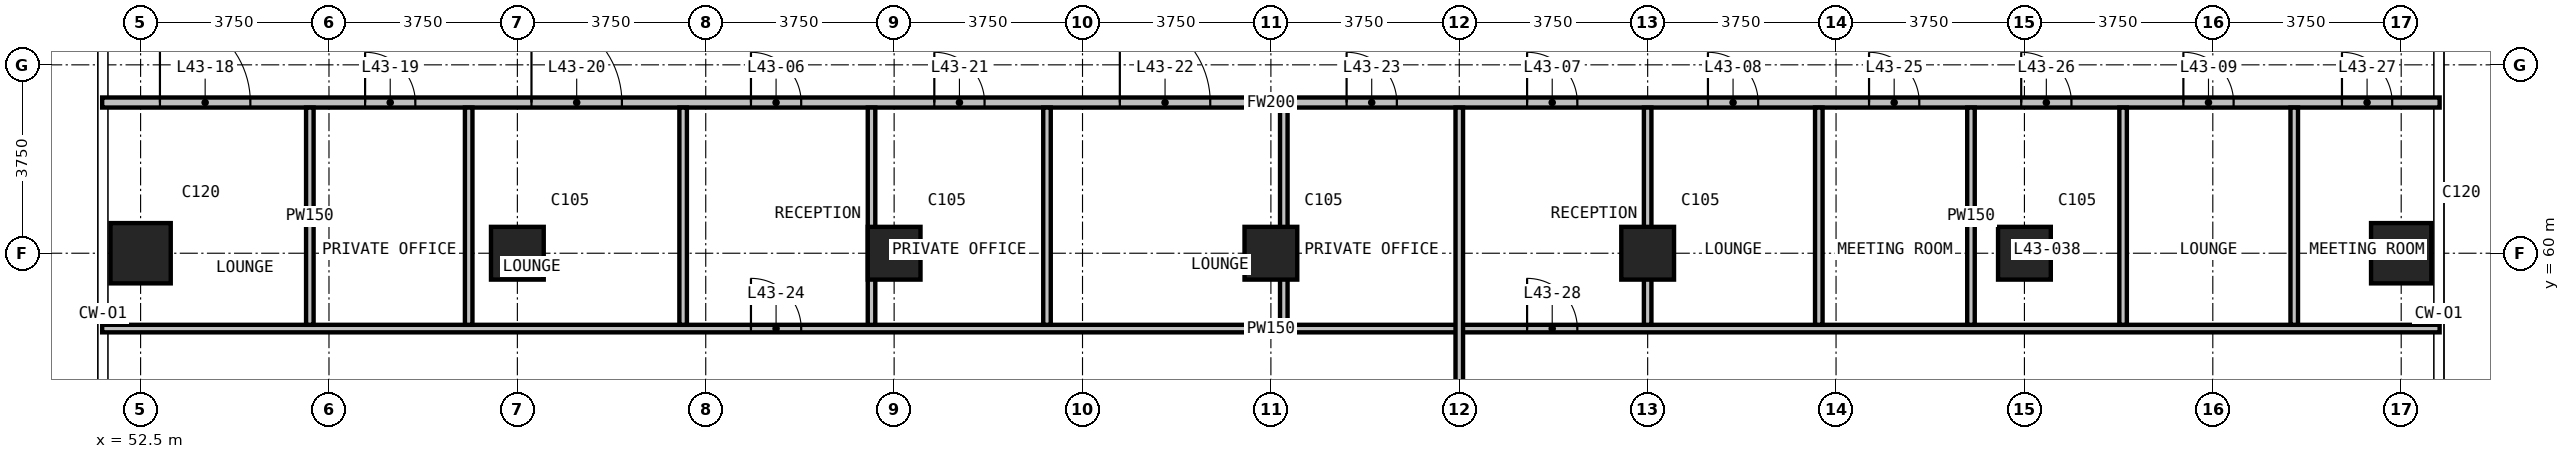
"""IFC4 building model, lengths in metres.
Left out: names, types, materials, properties, quantities, classifications, styles, units other than length and angle.
Written with IfcOpenShell. Run it as: python <this file> out.ifc"""

import sys

from ifc_helpers import new_model, si_unit, direction, frame, frame_2d, origin, origin_2d, place, context, subcontext, project, spatial, rectangle, extrude, element, fill, save


model = new_model("IFC4")
c1 = context("Model", 3, precision=1e-05, world=origin(), true_north=direction((0.0, 1.0)))
c2 = subcontext(c1, "Body", "Model", "MODEL_VIEW")
j1 = project(units=[si_unit("LENGTHUNIT", "METRE"), si_unit("PLANEANGLEUNIT", "RADIAN")], contexts=[c1])
p1 = place(None, origin())
s1 = spatial("IfcSite", under=j1, at=p1, CompositionType="ELEMENT")
p2 = place(p1, origin())
s2 = spatial("IfcBuilding", under=s1, at=p2, CompositionType="ELEMENT")
p3 = place(p2, frame((0.0, 0.0, 169.3)))
s3 = spatial("IfcBuildingStorey", under=s2, at=p3, CompositionType="ELEMENT", Elevation=169.3)
p4 = place(p3, frame((52.5, 60.0, 0.0), z_axis=(0.0, 0.0, 1.0), x_axis=(1.0, 0.0, 0.0)))
e1 = element("IfcColumn", 1, at=p4, inside=s3, PredefinedType="COLUMN", context=c2, shape_type="SweptSolid", body=[
    extrude(rectangle(XDim=1.2, YDim=1.2, at=origin_2d()), origin(), (0.0, 0.0, 1.0), 3.6),
])
for number, where, z_axis, x_axis in (
    (2, (60.0, 60.0, 0.0), (0.0, 0.0, 1.0), (1.0, 0.0, 0.0)),
    (3, (67.5, 60.0, 0.0), (0.0, 0.0, 1.0), (1.0, 0.0, 0.0)),
    (4, (75.0, 60.0, 0.0), (0.0, 0.0, 1.0), (1.0, 0.0, 0.0)),
    (5, (82.5, 60.0, 0.0), (0.0, 0.0, 1.0), (1.0, 0.0, 0.0)),
    (6, (90.0, 60.0, 0.0), (0.0, 0.0, 1.0), (1.0, 0.0, 0.0)),
):
    element("IfcColumn", number, at=place(p3, frame(where, z_axis=z_axis, x_axis=x_axis)), inside=s3, PredefinedType="COLUMN", context=c2, shape_type="SweptSolid", body=[
        extrude(rectangle(XDim=1.05, YDim=1.05, at=origin_2d()), origin(), (0.0, 0.0, 1.0), 3.6),
    ])
p5 = place(p3, frame((97.5, 60.0, 0.0), z_axis=(0.0, 0.0, 1.0), x_axis=(1.0, 0.0, 0.0)))
e7 = element("IfcColumn", 7, at=p5, inside=s3, PredefinedType="COLUMN", context=c2, shape_type="SweptSolid", body=[
    extrude(rectangle(XDim=1.2, YDim=1.2, at=origin_2d()), origin(), (0.0, 0.0, 1.0), 3.6),
])
p6 = place(p3, frame((51.735, 63.0, 0.0), z_axis=(0.0, 0.0, 1.0), x_axis=(1.0, 0.0, 0.0)))
e8 = element("IfcWall", 8, at=p6, inside=s3, PredefinedType="PARTITIONING", context=c2, shape_type="SweptSolid", body=[
    extrude(rectangle(XDim=46.53, YDim=0.2, at=frame_2d((23.265, 0.0))), origin(), (0.0, 0.0, 1.0), 3.3),
])
p7 = place(p6, frame((12.915, 0.0, 0.0)))
e9 = element("IfcOpeningElement", 9, at=p7, cuts=e8, PredefinedType="OPENING", context=c2, shape_type="SweptSolid", body=[
    extrude(rectangle(XDim=1.0, YDim=2.2, at=frame_2d((0.5, 1.1))), frame((0.0, 0.11, 0.0), z_axis=(0.0, -1.0, 0.0), x_axis=(1.0, 0.0, 0.0)), (0.0, 0.0, 1.0), 0.22),
])
p8 = place(p6, frame((28.365, 0.0, 0.0)))
e10 = element("IfcOpeningElement", 10, at=p8, cuts=e8, PredefinedType="OPENING", context=c2, shape_type="SweptSolid", body=[
    extrude(rectangle(XDim=1.0, YDim=2.2, at=frame_2d((0.5, 1.1))), frame((0.0, 0.11, 0.0), z_axis=(0.0, -1.0, 0.0), x_axis=(1.0, 0.0, 0.0)), (0.0, 0.0, 1.0), 0.22),
])
p9 = place(p6, frame((31.965, 0.0, 0.0)))
e11 = element("IfcOpeningElement", 11, at=p9, cuts=e8, PredefinedType="OPENING", context=c2, shape_type="SweptSolid", body=[
    extrude(rectangle(XDim=1.0, YDim=2.2, at=frame_2d((0.5, 1.1))), frame((0.0, 0.11, 0.0), z_axis=(0.0, -1.0, 0.0), x_axis=(1.0, 0.0, 0.0)), (0.0, 0.0, 1.0), 0.22),
])
p10 = place(p6, frame((41.429, 0.0, 0.0)))
e12 = element("IfcOpeningElement", 12, at=p10, cuts=e8, PredefinedType="OPENING", context=c2, shape_type="SweptSolid", body=[
    extrude(rectangle(XDim=1.0, YDim=2.2, at=frame_2d((0.5, 1.1))), frame((0.0, 0.11, 0.0), z_axis=(0.0, -1.0, 0.0), x_axis=(1.0, 0.0, 0.0)), (0.0, 0.0, 1.0), 0.22),
])
p11 = place(p6, frame((1.15, 0.0, 0.0)))
e13 = element("IfcOpeningElement", 13, at=p11, cuts=e8, PredefinedType="OPENING", context=c2, shape_type="SweptSolid", body=[
    extrude(rectangle(XDim=1.8, YDim=2.2, at=frame_2d((0.9, 1.1))), frame((0.0, 0.11, 0.0), z_axis=(0.0, -1.0, 0.0), x_axis=(1.0, 0.0, 0.0)), (0.0, 0.0, 1.0), 0.22),
])
p12 = place(p6, frame((5.234, 0.0, 0.0)))
e14 = element("IfcOpeningElement", 14, at=p12, cuts=e8, PredefinedType="OPENING", context=c2, shape_type="SweptSolid", body=[
    extrude(rectangle(XDim=1.0, YDim=2.2, at=frame_2d((0.5, 1.1))), frame((0.0, 0.11, 0.0), z_axis=(0.0, -1.0, 0.0), x_axis=(1.0, 0.0, 0.0)), (0.0, 0.0, 1.0), 0.22),
])
p13 = place(p6, frame((8.546, 0.0, 0.0)))
e15 = element("IfcOpeningElement", 15, at=p13, cuts=e8, PredefinedType="OPENING", context=c2, shape_type="SweptSolid", body=[
    extrude(rectangle(XDim=1.8, YDim=2.2, at=frame_2d((0.9, 1.1))), frame((0.0, 0.11, 0.0), z_axis=(0.0, -1.0, 0.0), x_axis=(1.0, 0.0, 0.0)), (0.0, 0.0, 1.0), 0.22),
])
p14 = place(p6, frame((16.565, 0.0, 0.0)))
e16 = element("IfcOpeningElement", 16, at=p14, cuts=e8, PredefinedType="OPENING", context=c2, shape_type="SweptSolid", body=[
    extrude(rectangle(XDim=1.0, YDim=2.2, at=frame_2d((0.5, 1.1))), frame((0.0, 0.11, 0.0), z_axis=(0.0, -1.0, 0.0), x_axis=(1.0, 0.0, 0.0)), (0.0, 0.0, 1.0), 0.22),
])
p15 = place(p6, frame((20.258, 0.0, 0.0)))
e17 = element("IfcOpeningElement", 17, at=p15, cuts=e8, PredefinedType="OPENING", context=c2, shape_type="SweptSolid", body=[
    extrude(rectangle(XDim=1.8, YDim=2.2, at=frame_2d((0.9, 1.1))), frame((0.0, 0.11, 0.0), z_axis=(0.0, -1.0, 0.0), x_axis=(1.0, 0.0, 0.0)), (0.0, 0.0, 1.0), 0.22),
])
p16 = place(p6, frame((24.772, 0.0, 0.0)))
e18 = element("IfcOpeningElement", 18, at=p16, cuts=e8, PredefinedType="OPENING", context=c2, shape_type="SweptSolid", body=[
    extrude(rectangle(XDim=1.0, YDim=2.2, at=frame_2d((0.5, 1.1))), frame((0.0, 0.11, 0.0), z_axis=(0.0, -1.0, 0.0), x_axis=(1.0, 0.0, 0.0)), (0.0, 0.0, 1.0), 0.22),
])
p17 = place(p6, frame((35.172, 0.0, 0.0)))
e19 = element("IfcOpeningElement", 19, at=p17, cuts=e8, PredefinedType="OPENING", context=c2, shape_type="SweptSolid", body=[
    extrude(rectangle(XDim=1.0, YDim=2.2, at=frame_2d((0.5, 1.1))), frame((0.0, 0.11, 0.0), z_axis=(0.0, -1.0, 0.0), x_axis=(1.0, 0.0, 0.0)), (0.0, 0.0, 1.0), 0.22),
])
p18 = place(p6, frame((38.201, 0.0, 0.0)))
e20 = element("IfcOpeningElement", 20, at=p18, cuts=e8, PredefinedType="OPENING", context=c2, shape_type="SweptSolid", body=[
    extrude(rectangle(XDim=1.0, YDim=2.2, at=frame_2d((0.5, 1.1))), frame((0.0, 0.11, 0.0), z_axis=(0.0, -1.0, 0.0), x_axis=(1.0, 0.0, 0.0)), (0.0, 0.0, 1.0), 0.22),
])
p19 = place(p6, frame((44.586, 0.0, 0.0)))
e21 = element("IfcOpeningElement", 21, at=p19, cuts=e8, PredefinedType="OPENING", context=c2, shape_type="SweptSolid", body=[
    extrude(rectangle(XDim=1.0, YDim=2.2, at=frame_2d((0.5, 1.1))), frame((0.0, 0.11, 0.0), z_axis=(0.0, -1.0, 0.0), x_axis=(1.0, 0.0, 0.0)), (0.0, 0.0, 1.0), 0.22),
])
p20 = place(p3, frame((51.735, 58.5, 0.0), z_axis=(0.0, 0.0, 1.0), x_axis=(1.0, 0.0, 0.0)))
e22 = element("IfcWall", 22, at=p20, inside=s3, PredefinedType="PARTITIONING", context=c2, shape_type="SweptSolid", body=[
    extrude(rectangle(XDim=46.53, YDim=0.15, at=frame_2d((23.265, 0.0))), origin(), (0.0, 0.0, 1.0), 3.3),
])
p21 = place(p20, frame((12.915, 0.0, 0.0)))
e23 = element("IfcOpeningElement", 23, at=p21, cuts=e22, PredefinedType="OPENING", context=c2, shape_type="SweptSolid", body=[
    extrude(rectangle(XDim=1.0, YDim=2.2, at=frame_2d((0.5, 1.1))), frame((0.0, 0.085, 0.0), z_axis=(0.0, -1.0, 0.0), x_axis=(1.0, 0.0, 0.0)), (0.0, 0.0, 1.0), 0.17),
])
p22 = place(p20, frame((28.365, 0.0, 0.0)))
e24 = element("IfcOpeningElement", 24, at=p22, cuts=e22, PredefinedType="OPENING", context=c2, shape_type="SweptSolid", body=[
    extrude(rectangle(XDim=1.0, YDim=2.2, at=frame_2d((0.5, 1.1))), frame((0.0, 0.085, 0.0), z_axis=(0.0, -1.0, 0.0), x_axis=(1.0, 0.0, 0.0)), (0.0, 0.0, 1.0), 0.17),
])
for number, where, z_axis, x_axis in (
    (25, (55.869, 58.575, 0.0), (0.0, 0.0, 1.0), (0.0, 1.0, 0.0)),
    (26, (59.031, 58.575, 0.0), (0.0, 0.0, 1.0), (0.0, 1.0, 0.0)),
    (27, (63.3, 58.575, 0.0), (0.0, 0.0, 1.0), (0.0, 1.0, 0.0)),
    (28, (67.05, 58.575, 0.0), (0.0, 0.0, 1.0), (0.0, 1.0, 0.0)),
    (29, (70.543, 58.575, 0.0), (0.0, 0.0, 1.0), (0.0, 1.0, 0.0)),
    (30, (75.257, 58.575, 0.0), (0.0, 0.0, 1.0), (0.0, 1.0, 0.0)),
):
    element("IfcWall", number, at=place(p3, frame(where, z_axis=z_axis, x_axis=x_axis)), inside=s3, PredefinedType="PARTITIONING", context=c2, shape_type="SweptSolid", body=[
        extrude(rectangle(XDim=4.325, YDim=0.15, at=frame_2d((2.163, 0.0))), origin(), (0.0, 0.0, 1.0), 3.3),
    ])
p23 = place(p3, frame((78.75, 44.235, 0.0), z_axis=(0.0, 0.0, 1.0), x_axis=(0.0, 1.0, 0.0)))
e31 = element("IfcWall", 31, at=p23, inside=s3, PredefinedType="PARTITIONING", context=c2, shape_type="SweptSolid", body=[
    extrude(rectangle(XDim=18.665, YDim=0.15, at=frame_2d((9.333, 0.0))), origin(), (0.0, 0.0, 1.0), 3.3),
])
for number, where, z_axis, x_axis in (
    (32, (82.5, 58.575, 0.0), (0.0, 0.0, 1.0), (0.0, 1.0, 0.0)),
    (33, (85.907, 58.575, 0.0), (0.0, 0.0, 1.0), (0.0, 1.0, 0.0)),
    (34, (88.936, 58.575, 0.0), (0.0, 0.0, 1.0), (0.0, 1.0, 0.0)),
    (35, (91.964, 58.575, 0.0), (0.0, 0.0, 1.0), (0.0, 1.0, 0.0)),
    (36, (95.371, 58.575, 0.0), (0.0, 0.0, 1.0), (0.0, 1.0, 0.0)),
):
    element("IfcWall", number, at=place(p3, frame(where, z_axis=z_axis, x_axis=x_axis)), inside=s3, PredefinedType="PARTITIONING", context=c2, shape_type="SweptSolid", body=[
        extrude(rectangle(XDim=4.325, YDim=0.15, at=frame_2d((2.163, 0.0))), origin(), (0.0, 0.0, 1.0), 3.3),
    ])
p24 = place(p7, origin())
e37 = element("IfcDoor", 37, at=p24, inside=s3, OperationType="SINGLE_SWING_LEFT", PredefinedType="DOOR", context=c2, shape_type="SweptSolid", body=[
    extrude(rectangle(XDim=1.0, YDim=2.2, at=frame_2d((0.5, 1.1))), frame((0.0, 0.025, 0.0), z_axis=(0.0, -1.0, 0.0), x_axis=(1.0, 0.0, 0.0)), (0.0, 0.0, 1.0), 0.05),
])
fill(e9, e37)
p25 = place(p8, origin())
e38 = element("IfcDoor", 38, at=p25, inside=s3, OperationType="SINGLE_SWING_LEFT", PredefinedType="DOOR", context=c2, shape_type="SweptSolid", body=[
    extrude(rectangle(XDim=1.0, YDim=2.2, at=frame_2d((0.5, 1.1))), frame((0.0, 0.025, 0.0), z_axis=(0.0, -1.0, 0.0), x_axis=(1.0, 0.0, 0.0)), (0.0, 0.0, 1.0), 0.05),
])
fill(e10, e38)
p26 = place(p9, origin())
e39 = element("IfcDoor", 39, at=p26, inside=s3, OperationType="SINGLE_SWING_RIGHT", PredefinedType="DOOR", context=c2, shape_type="SweptSolid", body=[
    extrude(rectangle(XDim=1.0, YDim=2.2, at=frame_2d((0.5, 1.1))), frame((0.0, 0.025, 0.0), z_axis=(0.0, -1.0, 0.0), x_axis=(1.0, 0.0, 0.0)), (0.0, 0.0, 1.0), 0.05),
])
fill(e11, e39)
p27 = place(p10, origin())
e40 = element("IfcDoor", 40, at=p27, inside=s3, OperationType="SINGLE_SWING_LEFT", PredefinedType="DOOR", context=c2, shape_type="SweptSolid", body=[
    extrude(rectangle(XDim=1.0, YDim=2.2, at=frame_2d((0.5, 1.1))), frame((0.0, 0.025, 0.0), z_axis=(0.0, -1.0, 0.0), x_axis=(1.0, 0.0, 0.0)), (0.0, 0.0, 1.0), 0.05),
])
fill(e12, e40)
p28 = place(p11, origin())
e41 = element("IfcDoor", 41, at=p28, inside=s3, OperationType="DOUBLE_DOOR_SINGLE_SWING", PredefinedType="DOOR", context=c2, shape_type="SweptSolid", body=[
    extrude(rectangle(XDim=1.8, YDim=2.2, at=frame_2d((0.9, 1.1))), frame((0.0, 0.025, 0.0), z_axis=(0.0, -1.0, 0.0), x_axis=(1.0, 0.0, 0.0)), (0.0, 0.0, 1.0), 0.05),
])
fill(e13, e41)
p29 = place(p12, origin())
e42 = element("IfcDoor", 42, at=p29, inside=s3, OperationType="SINGLE_SWING_LEFT", PredefinedType="DOOR", context=c2, shape_type="SweptSolid", body=[
    extrude(rectangle(XDim=1.0, YDim=2.2, at=frame_2d((0.5, 1.1))), frame((0.0, 0.025, 0.0), z_axis=(0.0, -1.0, 0.0), x_axis=(1.0, 0.0, 0.0)), (0.0, 0.0, 1.0), 0.05),
])
fill(e14, e42)
p30 = place(p13, origin())
e43 = element("IfcDoor", 43, at=p30, inside=s3, OperationType="DOUBLE_DOOR_SINGLE_SWING", PredefinedType="DOOR", context=c2, shape_type="SweptSolid", body=[
    extrude(rectangle(XDim=1.8, YDim=2.2, at=frame_2d((0.9, 1.1))), frame((0.0, 0.025, 0.0), z_axis=(0.0, -1.0, 0.0), x_axis=(1.0, 0.0, 0.0)), (0.0, 0.0, 1.0), 0.05),
])
fill(e15, e43)
p31 = place(p14, origin())
e44 = element("IfcDoor", 44, at=p31, inside=s3, OperationType="SINGLE_SWING_LEFT", PredefinedType="DOOR", context=c2, shape_type="SweptSolid", body=[
    extrude(rectangle(XDim=1.0, YDim=2.2, at=frame_2d((0.5, 1.1))), frame((0.0, 0.025, 0.0), z_axis=(0.0, -1.0, 0.0), x_axis=(1.0, 0.0, 0.0)), (0.0, 0.0, 1.0), 0.05),
])
fill(e16, e44)
p32 = place(p15, origin())
e45 = element("IfcDoor", 45, at=p32, inside=s3, OperationType="DOUBLE_DOOR_SINGLE_SWING", PredefinedType="DOOR", context=c2, shape_type="SweptSolid", body=[
    extrude(rectangle(XDim=1.8, YDim=2.2, at=frame_2d((0.9, 1.1))), frame((0.0, 0.025, 0.0), z_axis=(0.0, -1.0, 0.0), x_axis=(1.0, 0.0, 0.0)), (0.0, 0.0, 1.0), 0.05),
])
fill(e17, e45)
p33 = place(p16, origin())
e46 = element("IfcDoor", 46, at=p33, inside=s3, OperationType="SINGLE_SWING_RIGHT", PredefinedType="DOOR", context=c2, shape_type="SweptSolid", body=[
    extrude(rectangle(XDim=1.0, YDim=2.2, at=frame_2d((0.5, 1.1))), frame((0.0, 0.025, 0.0), z_axis=(0.0, -1.0, 0.0), x_axis=(1.0, 0.0, 0.0)), (0.0, 0.0, 1.0), 0.05),
])
fill(e18, e46)
p34 = place(p21, origin())
e47 = element("IfcDoor", 47, at=p34, inside=s3, OperationType="SINGLE_SWING_LEFT", PredefinedType="DOOR", context=c2, shape_type="SweptSolid", body=[
    extrude(rectangle(XDim=1.0, YDim=2.2, at=frame_2d((0.5, 1.1))), frame((0.0, 0.025, 0.0), z_axis=(0.0, -1.0, 0.0), x_axis=(1.0, 0.0, 0.0)), (0.0, 0.0, 1.0), 0.05),
])
fill(e23, e47)
p35 = place(p17, origin())
e48 = element("IfcDoor", 48, at=p35, inside=s3, OperationType="SINGLE_SWING_LEFT", PredefinedType="DOOR", context=c2, shape_type="SweptSolid", body=[
    extrude(rectangle(XDim=1.0, YDim=2.2, at=frame_2d((0.5, 1.1))), frame((0.0, 0.025, 0.0), z_axis=(0.0, -1.0, 0.0), x_axis=(1.0, 0.0, 0.0)), (0.0, 0.0, 1.0), 0.05),
])
fill(e19, e48)
p36 = place(p18, origin())
e49 = element("IfcDoor", 49, at=p36, inside=s3, OperationType="SINGLE_SWING_LEFT", PredefinedType="DOOR", context=c2, shape_type="SweptSolid", body=[
    extrude(rectangle(XDim=1.0, YDim=2.2, at=frame_2d((0.5, 1.1))), frame((0.0, 0.025, 0.0), z_axis=(0.0, -1.0, 0.0), x_axis=(1.0, 0.0, 0.0)), (0.0, 0.0, 1.0), 0.05),
])
fill(e20, e49)
p37 = place(p19, origin())
e50 = element("IfcDoor", 50, at=p37, inside=s3, OperationType="SINGLE_SWING_LEFT", PredefinedType="DOOR", context=c2, shape_type="SweptSolid", body=[
    extrude(rectangle(XDim=1.0, YDim=2.2, at=frame_2d((0.5, 1.1))), frame((0.0, 0.025, 0.0), z_axis=(0.0, -1.0, 0.0), x_axis=(1.0, 0.0, 0.0)), (0.0, 0.0, 1.0), 0.05),
])
fill(e21, e50)
p38 = place(p22, origin())
e51 = element("IfcDoor", 51, at=p38, inside=s3, OperationType="SINGLE_SWING_LEFT", PredefinedType="DOOR", context=c2, shape_type="SweptSolid", body=[
    extrude(rectangle(XDim=1.0, YDim=2.2, at=frame_2d((0.5, 1.1))), frame((0.0, 0.025, 0.0), z_axis=(0.0, -1.0, 0.0), x_axis=(1.0, 0.0, 0.0)), (0.0, 0.0, 1.0), 0.05),
])
fill(e24, e51)
save(model, sys.argv[1])
